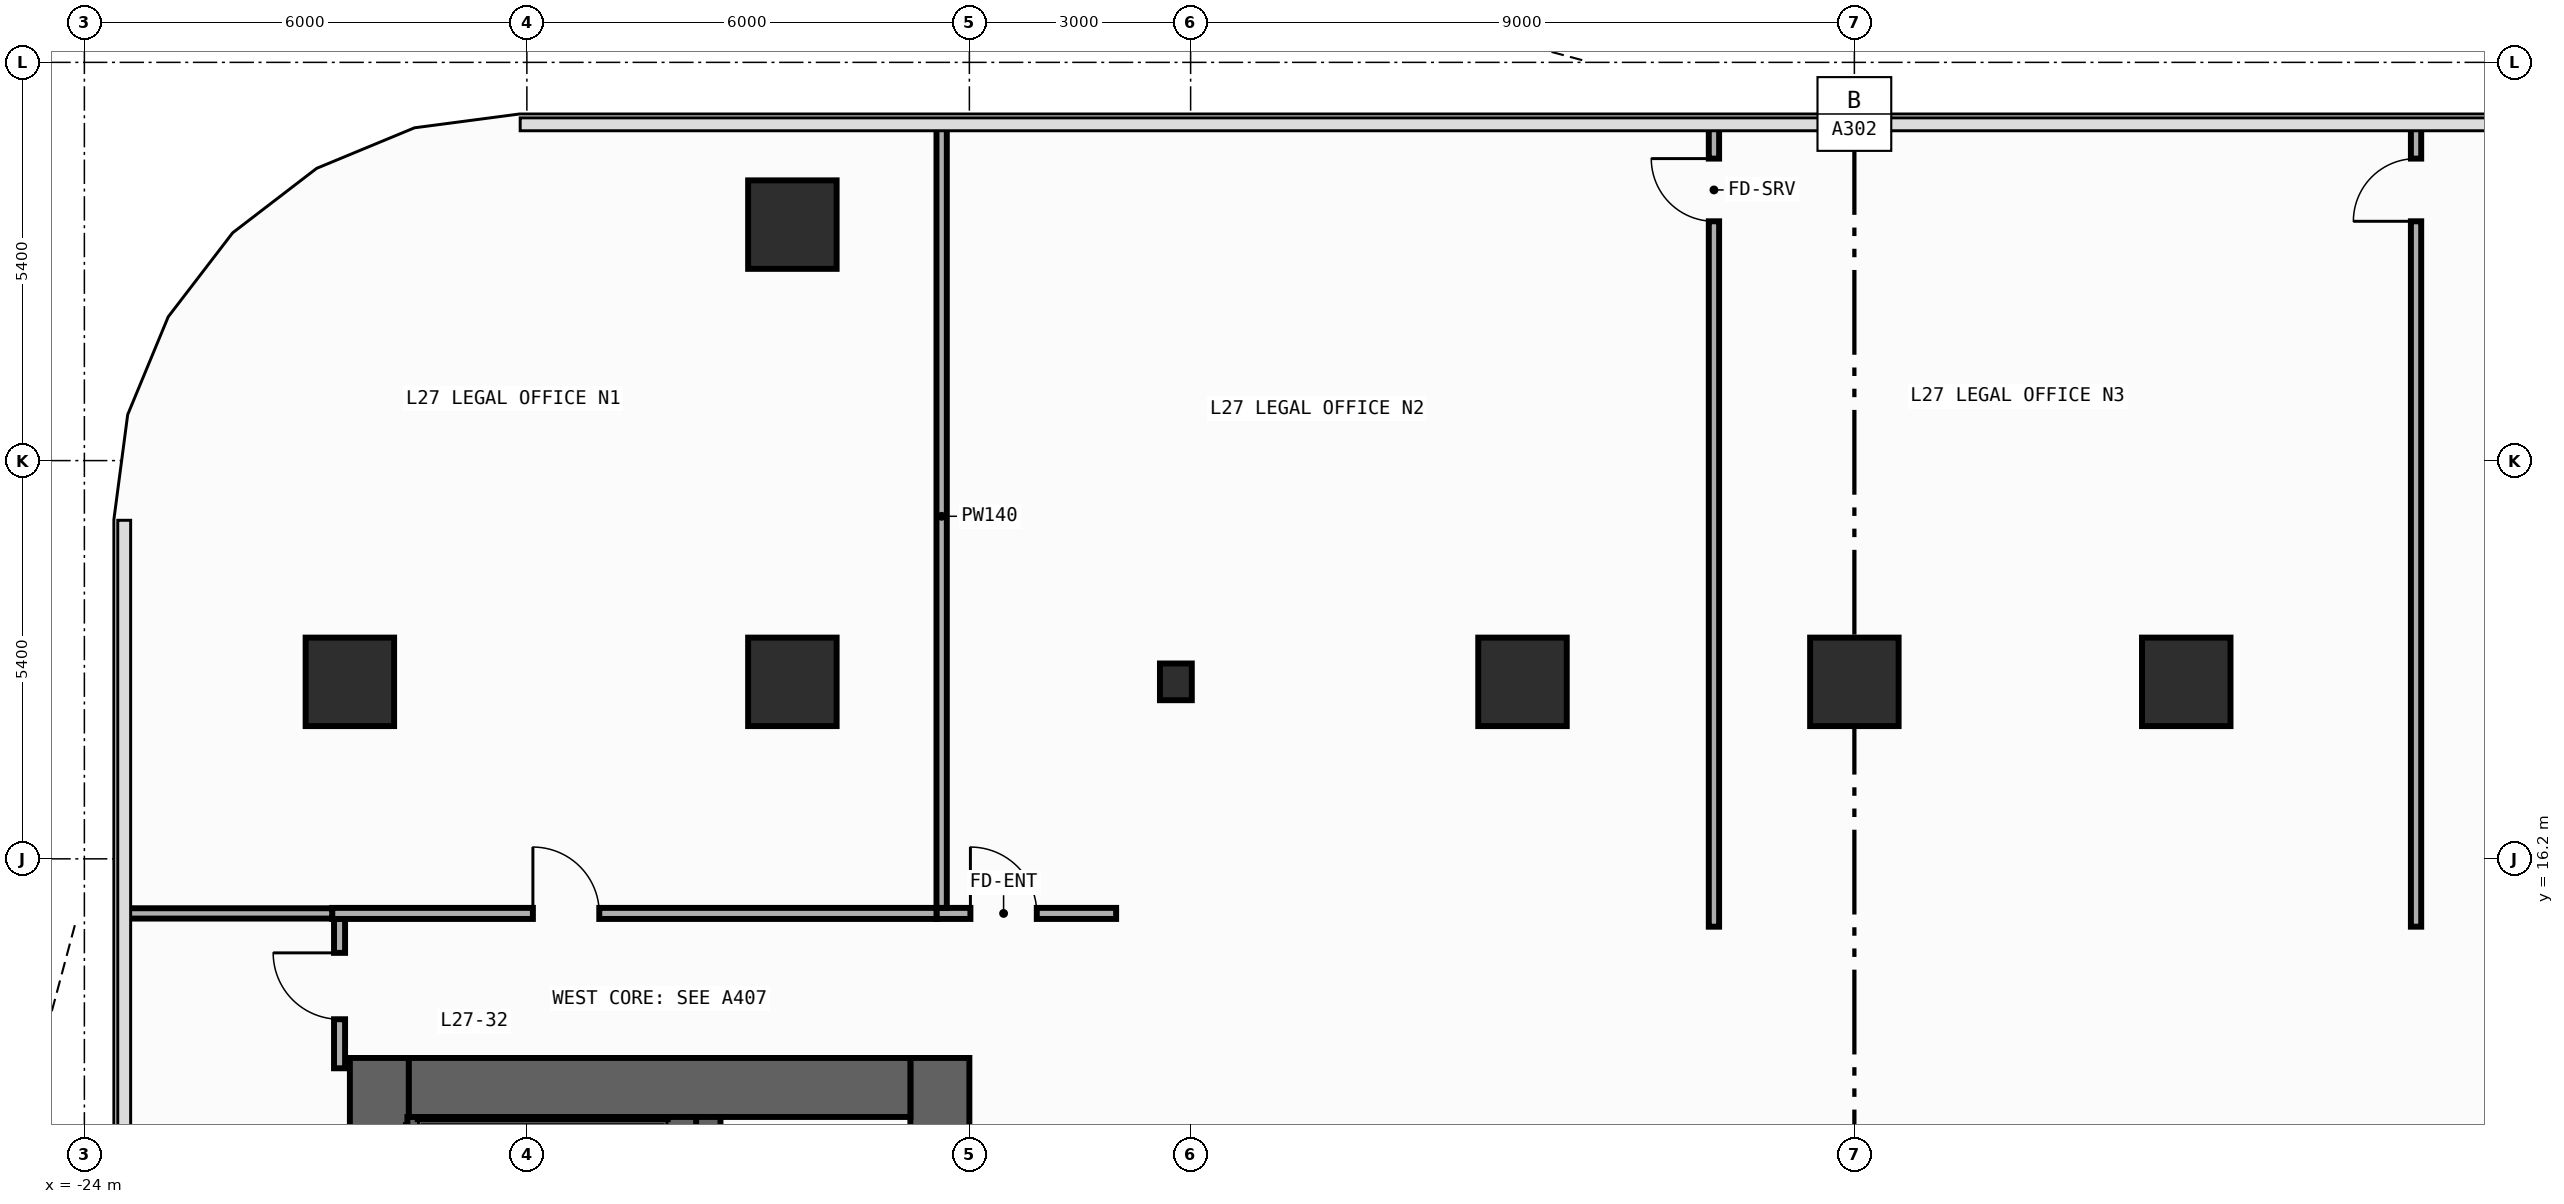
"""IFC4 building model, lengths in metres.
Left out: names, types, materials, properties, quantities, classifications, styles, units other than length and angle.
Written with IfcOpenShell. Run it as: python <this file> out.ifc"""

import sys

from ifc_helpers import new_model, si_unit, direction, frame, frame_2d, origin, origin_2d, place, context, subcontext, project, spatial, rectangle, i_section, extrude, element, fill, save


model = new_model("IFC4")
c1 = context("Model", 3, precision=1e-05, world=origin(), true_north=direction((0.0, 1.0)))
c2 = subcontext(c1, "Body", "Model", "MODEL_VIEW")
j1 = project(units=[si_unit("LENGTHUNIT", "METRE"), si_unit("PLANEANGLEUNIT", "RADIAN")], contexts=[c1])
p1 = place(None, origin())
s1 = spatial("IfcSite", under=j1, at=p1, CompositionType="ELEMENT")
p2 = place(p1, origin())
s2 = spatial("IfcBuilding", under=s1, at=p2, CompositionType="ELEMENT")
p3 = place(p2, frame((0.0, 0.0, 118.4)))
s3 = spatial("IfcBuildingStorey", under=s2, at=p3, CompositionType="ELEMENT", Elevation=118.4)
p4 = place(p3, frame((-20.0, -13.5, 0.0), z_axis=(0.0, 0.0, 1.0), x_axis=(0.0, 1.0, 0.0)))
e1 = element("IfcWall", 1, at=p4, inside=s3, PredefinedType="SHEAR", context=c2, shape_type="SweptSolid", body=[
    extrude(rectangle(XDim=27.0, YDim=0.8, at=frame_2d((13.5, 0.0))), origin(), (0.0, 0.0, 1.0), 3.94),
])
p5 = place(p3, frame((-12.4, -13.5, 0.0), z_axis=(0.0, 0.0, 1.0), x_axis=(0.0, 1.0, 0.0)))
e2 = element("IfcWall", 2, at=p5, inside=s3, PredefinedType="SHEAR", context=c2, shape_type="SweptSolid", body=[
    extrude(rectangle(XDim=27.0, YDim=0.8, at=frame_2d((13.5, 0.0))), origin(), (0.0, 0.0, 1.0), 3.94),
])
p6 = place(p5, frame((10.35, 0.0, 0.0)))
e3 = element("IfcOpeningElement", 3, at=p6, cuts=e2, PredefinedType="OPENING", context=c2, shape_type="SweptSolid", body=[
    extrude(rectangle(XDim=1.1, YDim=2.2, at=frame_2d((0.55, 1.1))), frame((0.0, 0.41, 0.0), z_axis=(0.0, -1.0, 0.0), x_axis=(1.0, 0.0, 0.0)), (0.0, 0.0, 1.0), 0.82),
])
p7 = place(p5, frame((7.15, 0.0, 0.0)))
e4 = element("IfcOpeningElement", 4, at=p7, cuts=e2, PredefinedType="OPENING", context=c2, shape_type="SweptSolid", body=[
    extrude(rectangle(XDim=1.1, YDim=2.2, at=frame_2d((0.55, 1.1))), frame((0.0, 0.41, 0.0), z_axis=(0.0, -1.0, 0.0), x_axis=(1.0, 0.0, 0.0)), (0.0, 0.0, 1.0), 0.82),
])
p8 = place(p5, frame((3.95, 0.0, 0.0)))
e5 = element("IfcOpeningElement", 5, at=p8, cuts=e2, PredefinedType="OPENING", context=c2, shape_type="SweptSolid", body=[
    extrude(rectangle(XDim=1.1, YDim=2.2, at=frame_2d((0.55, 1.1))), frame((0.0, 0.41, 0.0), z_axis=(0.0, -1.0, 0.0), x_axis=(1.0, 0.0, 0.0)), (0.0, 0.0, 1.0), 0.82),
])
p9 = place(p5, frame((15.175, 0.0, 0.0)))
e6 = element("IfcOpeningElement", 6, at=p9, cuts=e2, PredefinedType="OPENING", context=c2, shape_type="SweptSolid", body=[
    extrude(rectangle(XDim=0.85, YDim=2.1, at=frame_2d((0.425, 1.05))), frame((0.0, 0.41, 0.0), z_axis=(0.0, -1.0, 0.0), x_axis=(1.0, 0.0, 0.0)), (0.0, 0.0, 1.0), 0.82),
])
p10 = place(p5, frame((21.275, 0.0, 0.0)))
e7 = element("IfcOpeningElement", 7, at=p10, cuts=e2, PredefinedType="OPENING", context=c2, shape_type="SweptSolid", body=[
    extrude(rectangle(XDim=0.85, YDim=2.1, at=frame_2d((0.425, 1.05))), frame((0.0, 0.41, 0.0), z_axis=(0.0, -1.0, 0.0), x_axis=(1.0, 0.0, 0.0)), (0.0, 0.0, 1.0), 0.82),
])
p11 = place(p5, frame((12.725, 0.0, 0.0)))
e8 = element("IfcOpeningElement", 8, at=p11, cuts=e2, PredefinedType="OPENING", context=c2, shape_type="SweptSolid", body=[
    extrude(rectangle(XDim=1.15, YDim=2.2, at=frame_2d((0.575, 1.1))), frame((0.0, 0.41, 0.0), z_axis=(0.0, -1.0, 0.0), x_axis=(1.0, 0.0, 0.0)), (0.0, 0.0, 1.0), 0.82),
])
p12 = place(p5, frame((1.625, 0.0, 0.0)))
e9 = element("IfcOpeningElement", 9, at=p12, cuts=e2, PredefinedType="OPENING", context=c2, shape_type="SweptSolid", body=[
    extrude(rectangle(XDim=0.85, YDim=2.1, at=frame_2d((0.425, 1.05))), frame((0.0, 0.41, 0.0), z_axis=(0.0, -1.0, 0.0), x_axis=(1.0, 0.0, 0.0)), (0.0, 0.0, 1.0), 0.82),
])
p13 = place(p3, frame((-19.6, 13.1, 0.0), z_axis=(0.0, 0.0, 1.0), x_axis=(1.0, 0.0, 0.0)))
e10 = element("IfcWall", 10, at=p13, inside=s3, PredefinedType="SHEAR", context=c2, shape_type="SweptSolid", body=[
    extrude(rectangle(XDim=6.8, YDim=0.8, at=frame_2d((3.4, 0.0))), origin(), (0.0, 0.0, 1.0), 3.94),
])
p14 = place(p3, frame((-15.55, -12.7, 0.0), z_axis=(0.0, 0.0, 1.0), x_axis=(0.0, 1.0, 0.0)))
e11 = element("IfcWall", 11, at=p14, inside=s3, PredefinedType="SHEAR", context=c2, shape_type="SweptSolid", body=[
    extrude(rectangle(XDim=25.4, YDim=0.35, at=frame_2d((12.7, 0.0))), origin(), (0.0, 0.0, 1.0), 3.94),
])
p15 = place(p14, frame((11.925, 0.0, 0.0)))
e12 = element("IfcOpeningElement", 12, at=p15, cuts=e11, PredefinedType="OPENING", context=c2, shape_type="SweptSolid", body=[
    extrude(rectangle(XDim=1.15, YDim=2.2, at=frame_2d((0.575, 1.1))), frame((0.0, 0.185, 0.0), z_axis=(0.0, -1.0, 0.0), x_axis=(1.0, 0.0, 0.0)), (0.0, 0.0, 1.0), 0.37),
])
p16 = place(p14, frame((0.825, 0.0, 0.0)))
e13 = element("IfcOpeningElement", 13, at=p16, cuts=e11, PredefinedType="OPENING", context=c2, shape_type="SweptSolid", body=[
    extrude(rectangle(XDim=0.85, YDim=2.1, at=frame_2d((0.425, 1.05))), frame((0.0, 0.185, 0.0), z_axis=(0.0, -1.0, 0.0), x_axis=(1.0, 0.0, 0.0)), (0.0, 0.0, 1.0), 0.37),
])
p17 = place(p3, frame((-19.62, 12.59, 0.0), z_axis=(0.0, 0.0, 1.0), x_axis=(1.0, 0.0, 0.0)))
e14 = element("IfcWall", 14, at=p17, inside=s3, PredefinedType="SHEAR", context=c2, shape_type="SweptSolid", body=[
    extrude(rectangle(XDim=3.915, YDim=0.22, at=frame_2d((1.958, 0.0))), origin(), (0.0, 0.0, 1.0), 3.94),
])
p18 = place(p3, frame((-9.2, 18.6, 0.0), z_axis=(0.0, 0.0, 1.0), x_axis=(1.0, 0.0, 0.0)))
e15 = element("IfcColumn", 15, at=p18, inside=s3, PredefinedType="COLUMN", context=c2, shape_type="SweptSolid", body=[
    extrude(i_section(OverallWidth=0.432, OverallDepth=0.498, WebThickness=0.045, FlangeThickness=0.07, FilletRadius=0.022, at=origin_2d()), origin(), (0.0, 0.0, 1.0), 4.2),
])
for number, where, z_axis, x_axis in (
    (16, (-20.4, 18.6, 0.0), (0.0, 0.0, 1.0), (1.0, 0.0, 0.0)),
    (17, (-14.4, 18.6, 0.0), (0.0, 0.0, 1.0), (1.0, 0.0, 0.0)),
    (18, (-4.5, 18.6, 0.0), (0.0, 0.0, 1.0), (1.0, 0.0, 0.0)),
    (19, (0.0, 18.6, 0.0), (0.0, 0.0, 1.0), (1.0, 0.0, 0.0)),
    (20, (4.5, 18.6, 0.0), (0.0, 0.0, 1.0), (1.0, 0.0, 0.0)),
    (21, (-14.4, 24.8, 0.0), (0.0, 0.0, 1.0), (1.0, 0.0, 0.0)),
):
    element("IfcColumn", number, at=place(p3, frame(where, z_axis=z_axis, x_axis=x_axis)), inside=s3, PredefinedType="COLUMN", context=c2, shape_type="SweptSolid", body=[
        extrude(rectangle(XDim=1.2, YDim=1.2, at=origin_2d()), origin(), (0.0, 0.0, 1.0), 4.2),
    ])
p19 = place(p3, frame((-12.446, 15.46, 0.0), z_axis=(0.0, 0.0, 1.0), x_axis=(1.0, 0.0, 0.0)))
e22 = element("IfcWall", 22, at=p19, inside=s3, PredefinedType="PARTITIONING", context=c2, shape_type="SweptSolid", body=[
    extrude(rectangle(XDim=2.436, YDim=0.15, at=frame_2d((1.218, 0.0))), origin(), (0.0, 0.0, 1.0), 3.94),
])
p20 = place(p19, frame((0.46, 0.0, 0.0)))
e23 = element("IfcOpeningElement", 23, at=p20, cuts=e22, PredefinedType="OPENING", context=c2, shape_type="SweptSolid", body=[
    extrude(rectangle(XDim=0.9, YDim=2.15, at=frame_2d((0.45, 1.075))), frame((0.0, 0.085, 0.0), z_axis=(0.0, -1.0, 0.0), x_axis=(1.0, 0.0, 0.0)), (0.0, 0.0, 1.0), 0.17),
])
p21 = place(p3, frame((-20.54, 13.36, 0.0), z_axis=(0.0, 0.0, 1.0), x_axis=(0.0, 1.0, 0.0)))
e24 = element("IfcWall", 24, at=p21, inside=s3, PredefinedType="PARTITIONING", context=c2, shape_type="SweptSolid", body=[
    extrude(rectangle(XDim=2.025, YDim=0.15, at=frame_2d((1.012, 0.0))), origin(), (0.0, 0.0, 1.0), 3.94),
])
p22 = place(p21, frame((0.665, 0.0, 0.0)))
e25 = element("IfcOpeningElement", 25, at=p22, cuts=e24, PredefinedType="OPENING", context=c2, shape_type="SweptSolid", body=[
    extrude(rectangle(XDim=0.9, YDim=2.15, at=frame_2d((0.45, 1.075))), frame((0.0, 0.085, 0.0), z_axis=(0.0, -1.0, 0.0), x_axis=(1.0, 0.0, 0.0)), (0.0, 0.0, 1.0), 0.17),
])
p23 = place(p3, frame((-20.64, 15.46, 0.0), z_axis=(0.0, 0.0, 1.0), x_axis=(1.0, 0.0, 0.0)))
e26 = element("IfcWall", 26, at=p23, inside=s3, PredefinedType="PARTITIONING", context=c2, shape_type="SweptSolid", body=[
    extrude(rectangle(XDim=8.194, YDim=0.15, at=frame_2d((4.097, 0.0))), origin(), (0.0, 0.0, 1.0), 3.94),
])
p24 = place(p23, frame((2.722, 0.0, 0.0)))
e27 = element("IfcOpeningElement", 27, at=p24, cuts=e26, PredefinedType="OPENING", context=c2, shape_type="SweptSolid", body=[
    extrude(rectangle(XDim=0.9, YDim=2.15, at=frame_2d((0.45, 1.075))), frame((0.0, 0.085, 0.0), z_axis=(0.0, -1.0, 0.0), x_axis=(1.0, 0.0, 0.0)), (0.0, 0.0, 1.0), 0.17),
])
p25 = place(p3, frame((-23.455, 15.46, 0.0), z_axis=(0.0, 0.0, 1.0), x_axis=(1.0, 0.0, 0.0)))
e28 = element("IfcWall", 28, at=p25, inside=s3, PredefinedType="PARTITIONING", context=c2, shape_type="SweptSolid", body=[
    extrude(rectangle(XDim=2.815, YDim=0.14, at=frame_2d((1.408, 0.0))), origin(), (0.0, 0.0, 1.0), 3.94),
])
p26 = place(p3, frame((-12.376, 15.535, 0.0), z_axis=(0.0, 0.0, 1.0), x_axis=(0.0, 1.0, 0.0)))
e29 = element("IfcWall", 29, at=p26, inside=s3, PredefinedType="PARTITIONING", context=c2, shape_type="SweptSolid", body=[
    extrude(rectangle(XDim=10.62, YDim=0.14, at=frame_2d((5.31, 0.0))), origin(), (0.0, 0.0, 1.0), 3.94),
])
p27 = place(p3, frame((-1.904, 15.28, 0.0), z_axis=(0.0, 0.0, 1.0), x_axis=(0.0, 1.0, 0.0)))
e30 = element("IfcWall", 30, at=p27, inside=s3, PredefinedType="PARTITIONING", context=c2, shape_type="SweptSolid", body=[
    extrude(rectangle(XDim=10.875, YDim=0.14, at=frame_2d((5.438, 0.0))), origin(), (0.0, 0.0, 1.0), 3.94),
])
p28 = place(p27, frame((9.565, 0.0, 0.0)))
e31 = element("IfcOpeningElement", 31, at=p28, cuts=e30, PredefinedType="OPENING", context=c2, shape_type="SweptSolid", body=[
    extrude(rectangle(XDim=0.85, YDim=2.1, at=frame_2d((0.425, 1.05))), frame((0.0, 0.08, 0.0), z_axis=(0.0, -1.0, 0.0), x_axis=(1.0, 0.0, 0.0)), (0.0, 0.0, 1.0), 0.16),
])
p29 = place(p3, frame((7.616, 15.28, 0.0), z_axis=(0.0, 0.0, 1.0), x_axis=(0.0, 1.0, 0.0)))
e32 = element("IfcWall", 32, at=p29, inside=s3, PredefinedType="PARTITIONING", context=c2, shape_type="SweptSolid", body=[
    extrude(rectangle(XDim=10.875, YDim=0.14, at=frame_2d((5.438, 0.0))), origin(), (0.0, 0.0, 1.0), 3.94),
])
p30 = place(p29, frame((9.565, 0.0, 0.0)))
e33 = element("IfcOpeningElement", 33, at=p30, cuts=e32, PredefinedType="OPENING", context=c2, shape_type="SweptSolid", body=[
    extrude(rectangle(XDim=0.85, YDim=2.1, at=frame_2d((0.425, 1.05))), frame((0.0, 0.08, 0.0), z_axis=(0.0, -1.0, 0.0), x_axis=(1.0, 0.0, 0.0)), (0.0, 0.0, 1.0), 0.16),
])
p31 = place(p20, origin())
e34 = element("IfcDoor", 34, at=p31, inside=s3, OperationType="SINGLE_SWING_LEFT", PredefinedType="DOOR", context=c2, shape_type="SweptSolid", body=[
    extrude(rectangle(XDim=0.9, YDim=2.15, at=frame_2d((0.45, 1.075))), frame((0.0, 0.025, 0.0), z_axis=(0.0, -1.0, 0.0), x_axis=(1.0, 0.0, 0.0)), (0.0, 0.0, 1.0), 0.05),
])
fill(e23, e34)
p32 = place(p22, origin())
e35 = element("IfcDoor", 35, at=p32, inside=s3, OperationType="SINGLE_SWING_RIGHT", PredefinedType="DOOR", context=c2, shape_type="SweptSolid", body=[
    extrude(rectangle(XDim=0.9, YDim=2.15, at=frame_2d((0.45, 1.075))), frame((0.0, 0.025, 0.0), z_axis=(0.0, -1.0, 0.0), x_axis=(1.0, 0.0, 0.0)), (0.0, 0.0, 1.0), 0.05),
])
fill(e25, e35)
p33 = place(p24, origin())
e36 = element("IfcDoor", 36, at=p33, inside=s3, OperationType="SINGLE_SWING_LEFT", PredefinedType="DOOR", context=c2, shape_type="SweptSolid", body=[
    extrude(rectangle(XDim=0.9, YDim=2.15, at=frame_2d((0.45, 1.075))), frame((0.0, 0.025, 0.0), z_axis=(0.0, -1.0, 0.0), x_axis=(1.0, 0.0, 0.0)), (0.0, 0.0, 1.0), 0.05),
])
fill(e27, e36)
p34 = place(p28, origin())
e37 = element("IfcDoor", 37, at=p34, inside=s3, OperationType="SINGLE_SWING_RIGHT", PredefinedType="DOOR", context=c2, shape_type="SweptSolid", body=[
    extrude(rectangle(XDim=0.85, YDim=2.1, at=frame_2d((0.425, 1.05))), frame((0.0, 0.025, 0.0), z_axis=(0.0, -1.0, 0.0), x_axis=(1.0, 0.0, 0.0)), (0.0, 0.0, 1.0), 0.05),
])
fill(e31, e37)
p35 = place(p30, origin())
e38 = element("IfcDoor", 38, at=p35, inside=s3, OperationType="SINGLE_SWING_LEFT", PredefinedType="DOOR", context=c2, shape_type="SweptSolid", body=[
    extrude(rectangle(XDim=0.85, YDim=2.1, at=frame_2d((0.425, 1.05))), frame((0.0, 0.025, 0.0), z_axis=(0.0, -1.0, 0.0), x_axis=(1.0, 0.0, 0.0)), (0.0, 0.0, 1.0), 0.05),
])
fill(e33, e38)
save(model, sys.argv[1])
